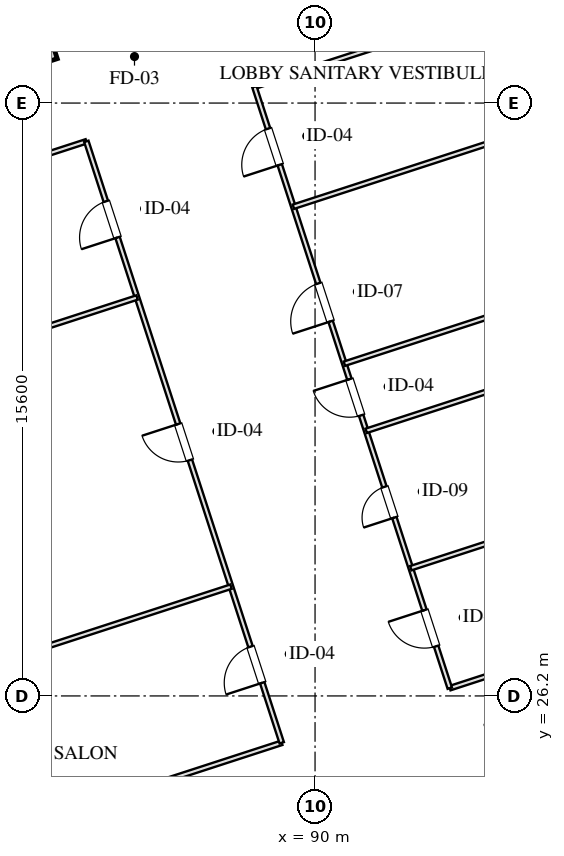
"""IFC4 building model, lengths in metres.
Left out: names, types, materials, properties, quantities, classifications, styles, units other than length and angle.
Written with IfcOpenShell. Run it as: python <this file> out.ifc"""

import sys

from ifc_helpers import new_model, si_unit, direction, frame, frame_2d, origin, place, context, subcontext, project, spatial, rectangle, extrude, element, fill, save


model = new_model("IFC4")
c1 = context("Model", 3, precision=1e-05, world=origin(), true_north=direction((0.0, 1.0)))
c2 = subcontext(c1, "Body", "Model", "MODEL_VIEW")
j1 = project(units=[si_unit("LENGTHUNIT", "METRE"), si_unit("PLANEANGLEUNIT", "RADIAN")], contexts=[c1])
p1 = place(None, origin())
s1 = spatial("IfcSite", under=j1, at=p1, CompositionType="ELEMENT")
p2 = place(p1, origin())
s2 = spatial("IfcBuilding", under=s1, at=p2, CompositionType="ELEMENT")
p3 = place(p2, frame((0.0, 0.0, 60.95)))
s3 = spatial("IfcBuildingStorey", under=s2, at=p3, CompositionType="ELEMENT", Elevation=60.95)
p4 = place(p3, frame((79.016, 41.997, 0.0), z_axis=(0.0, 0.0, 1.0), x_axis=(0.95106038264, 0.309005094736, 0.0)))
e1 = element("IfcWall", 1, at=p4, inside=s3, PredefinedType="SHEAR", context=c2, shape_type="SweptSolid", body=[
    extrude(rectangle(XDim=4.295, YDim=0.75, at=frame_2d((2.147, 0.0))), origin(), (0.0, 0.0, 1.0), 3.45),
])
p5 = place(p3, frame((93.542, 23.585, 0.0), z_axis=(0.0, 0.0, 1.0), x_axis=(0.951063829732, 0.308994485023, 0.0)))
e2 = element("IfcWall", 2, at=p5, inside=s3, PredefinedType="PARTITIONING", context=c2, shape_type="SweptSolid", body=[
    extrude(rectangle(XDim=4.4, YDim=0.15, at=frame_2d((2.2, 0.0))), origin(), (0.0, 0.0, 1.0), 3.175),
])
p6 = place(p5, frame((1.45, 0.0, 0.0)))
e3 = element("IfcOpeningElement", 3, at=p6, cuts=e2, PredefinedType="OPENING", context=c2, shape_type="SweptSolid", body=[
    extrude(rectangle(XDim=1.5, YDim=2.05, at=frame_2d((0.75, 1.025))), frame((0.0, 0.085, 0.0), z_axis=(0.0, -1.0, 0.0), x_axis=(1.0, 0.0, 0.0)), (0.0, 0.0, 1.0), 0.17),
])
p7 = place(p3, frame((74.691, 20.278, 0.0), z_axis=(0.0, 0.0, 1.0), x_axis=(0.951054756643, 0.309022409974, 0.0)))
e4 = element("IfcWall", 4, at=p7, inside=s3, PredefinedType="PARTITIONING", context=c2, shape_type="SweptSolid", body=[
    extrude(rectangle(XDim=15.175, YDim=0.12, at=frame_2d((7.587, 0.0))), origin(), (0.0, 0.0, 1.0), 3.175),
])
p8 = place(p3, frame((93.546, 26.404, 0.0), z_axis=(0.0, 0.0, 1.0), x_axis=(0.951058189574, 0.309011844505, 0.0)))
e5 = element("IfcWall", 5, at=p8, inside=s3, PredefinedType="PARTITIONING", context=c2, shape_type="SweptSolid", body=[
    extrude(rectangle(XDim=17.775, YDim=0.12, at=frame_2d((8.887, 0.0))), origin(), (0.0, 0.0, 1.0), 3.175),
])
p9 = place(p3, frame((69.549, 36.103, 0.0), z_axis=(0.0, 0.0, 1.0), x_axis=(0.951054756643, 0.309022409974, 0.0)))
e6 = element("IfcWall", 6, at=p9, inside=s3, PredefinedType="PARTITIONING", context=c2, shape_type="SweptSolid", body=[
    extrude(rectangle(XDim=15.175, YDim=0.12, at=frame_2d((7.587, 0.0))), origin(), (0.0, 0.0, 1.0), 3.175),
])
p10 = place(p3, frame((88.404, 42.229, 0.0), z_axis=(0.0, 0.0, 1.0), x_axis=(0.951054152931, 0.309024267966, 0.0)))
e7 = element("IfcWall", 7, at=p10, inside=s3, PredefinedType="PARTITIONING", context=c2, shape_type="SweptSolid", body=[
    extrude(rectangle(XDim=17.775, YDim=0.12, at=frame_2d((8.888, 0.0))), origin(), (0.0, 0.0, 1.0), 3.175),
])
p11 = place(p3, frame((89.124, 24.967, 0.0), z_axis=(0.0, 0.0, 1.0), x_axis=(-0.30901773025, 0.951056277195, 0.0)))
e8 = element("IfcWall", 8, at=p11, inside=s3, PredefinedType="PARTITIONING", context=c2, shape_type="SweptSolid", body=[
    extrude(rectangle(XDim=16.64, YDim=0.12, at=frame_2d((8.32, 0.0))), origin(), (0.0, 0.0, 1.0), 3.175),
])
p12 = place(p11, frame((1.66, 0.0, 0.0)))
e9 = element("IfcOpeningElement", 9, at=p12, cuts=e8, PredefinedType="OPENING", context=c2, shape_type="SweptSolid", body=[
    extrude(rectangle(XDim=1.0, YDim=2.05, at=frame_2d((0.5, 1.025))), frame((0.0, 0.07, 0.0), z_axis=(0.0, -1.0, 0.0), x_axis=(1.0, 0.0, 0.0)), (0.0, 0.0, 1.0), 0.14),
])
p13 = place(p11, frame((7.82, 0.0, 0.0)))
e10 = element("IfcOpeningElement", 10, at=p13, cuts=e8, PredefinedType="OPENING", context=c2, shape_type="SweptSolid", body=[
    extrude(rectangle(XDim=1.0, YDim=2.05, at=frame_2d((0.5, 1.025))), frame((0.0, 0.07, 0.0), z_axis=(0.0, -1.0, 0.0), x_axis=(1.0, 0.0, 0.0)), (0.0, 0.0, 1.0), 0.14),
])
p14 = place(p11, frame((13.98, 0.0, 0.0)))
e11 = element("IfcOpeningElement", 11, at=p14, cuts=e8, PredefinedType="OPENING", context=c2, shape_type="SweptSolid", body=[
    extrude(rectangle(XDim=1.0, YDim=2.05, at=frame_2d((0.5, 1.025))), frame((0.0, 0.07, 0.0), z_axis=(0.0, -1.0, 0.0), x_axis=(1.0, 0.0, 0.0)), (0.0, 0.0, 1.0), 0.14),
])
p15 = place(p3, frame((93.546, 26.404, 0.0), z_axis=(0.0, 0.0, 1.0), x_axis=(-0.309022042254, 0.951054876125, 0.0)))
e12 = element("IfcWall", 12, at=p15, inside=s3, PredefinedType="PARTITIONING", context=c2, shape_type="SweptSolid", body=[
    extrude(rectangle(XDim=16.64, YDim=0.12, at=frame_2d((8.32, 0.0))), origin(), (0.0, 0.0, 1.0), 3.175),
])
p16 = place(p15, frame((1.16, 0.0, 0.0)))
e13 = element("IfcOpeningElement", 13, at=p16, cuts=e12, PredefinedType="OPENING", context=c2, shape_type="SweptSolid", body=[
    extrude(rectangle(XDim=1.0, YDim=2.05, at=frame_2d((0.5, 1.025))), frame((0.0, 0.07, 0.0), z_axis=(0.0, -1.0, 0.0), x_axis=(1.0, 0.0, 0.0)), (0.0, 0.0, 1.0), 0.14),
])
p17 = place(p15, frame((4.72, 0.0, 0.0)))
e14 = element("IfcOpeningElement", 14, at=p17, cuts=e12, PredefinedType="OPENING", context=c2, shape_type="SweptSolid", body=[
    extrude(rectangle(XDim=0.85, YDim=2.05, at=frame_2d((0.425, 1.025))), frame((0.0, 0.07, 0.0), z_axis=(0.0, -1.0, 0.0), x_axis=(1.0, 0.0, 0.0)), (0.0, 0.0, 1.0), 0.14),
])
p18 = place(p15, frame((7.549, 0.0, 0.0)))
e15 = element("IfcOpeningElement", 15, at=p18, cuts=e12, PredefinedType="OPENING", context=c2, shape_type="SweptSolid", body=[
    extrude(rectangle(XDim=1.0, YDim=2.05, at=frame_2d((0.5, 1.025))), frame((0.0, 0.07, 0.0), z_axis=(0.0, -1.0, 0.0), x_axis=(1.0, 0.0, 0.0)), (0.0, 0.0, 1.0), 0.14),
])
p19 = place(p15, frame((10.148, 0.0, 0.0)))
e16 = element("IfcOpeningElement", 16, at=p19, cuts=e12, PredefinedType="OPENING", context=c2, shape_type="SweptSolid", body=[
    extrude(rectangle(XDim=1.05, YDim=2.05, at=frame_2d((0.525, 1.025))), frame((0.0, 0.07, 0.0), z_axis=(0.0, -1.0, 0.0), x_axis=(1.0, 0.0, 0.0)), (0.0, 0.0, 1.0), 0.14),
])
p20 = place(p15, frame((14.48, 0.0, 0.0)))
e17 = element("IfcOpeningElement", 17, at=p20, cuts=e12, PredefinedType="OPENING", context=c2, shape_type="SweptSolid", body=[
    extrude(rectangle(XDim=1.0, YDim=2.05, at=frame_2d((0.5, 1.025))), frame((0.0, 0.07, 0.0), z_axis=(0.0, -1.0, 0.0), x_axis=(1.0, 0.0, 0.0)), (0.0, 0.0, 1.0), 0.14),
])
for number, where, z_axis, x_axis in (
    (18, (73.356, 24.386, 0.0), (0.0, 0.0, 1.0), (0.951, 0.309, 0.0)),
    (19, (70.884, 31.995, 0.0), (0.0, 0.0, 1.0), (0.951, 0.309, 0.0)),
):
    element("IfcWall", number, at=place(p3, frame(where, z_axis=z_axis, x_axis=x_axis)), inside=s3, PredefinedType="PARTITIONING", context=c2, shape_type="SweptSolid", body=[
        extrude(rectangle(XDim=15.175, YDim=0.12, at=frame_2d((7.587, 0.0))), origin(), (0.0, 0.0, 1.0), 3.175),
    ])
for number, where, z_axis, x_axis in (
    (20, (92.52, 29.562, 0.0), (0.0, 0.0, 1.0), (0.951, 0.309, 0.0)),
    (21, (91.346, 33.176, 0.0), (0.0, 0.0, 1.0), (0.951, 0.309, 0.0)),
    (22, (90.772, 34.942, 0.0), (0.0, 0.0, 1.0), (0.951, 0.309, 0.0)),
    (23, (89.43, 39.072, 0.0), (0.0, 0.0, 1.0), (0.951, 0.309, 0.0)),
):
    element("IfcWall", number, at=place(p3, frame(where, z_axis=z_axis, x_axis=x_axis)), inside=s3, PredefinedType="PARTITIONING", context=c2, shape_type="SweptSolid", body=[
        extrude(rectangle(XDim=17.775, YDim=0.12, at=frame_2d((8.887, 0.0))), origin(), (0.0, 0.0, 1.0), 3.175),
    ])
p21 = place(p12, origin())
e24 = element("IfcDoor", 24, at=p21, inside=s3, OperationType="SINGLE_SWING_LEFT", PredefinedType="DOOR", context=c2, shape_type="SweptSolid", body=[
    extrude(rectangle(XDim=1.0, YDim=2.05, at=frame_2d((0.5, 1.025))), frame((0.0, 0.025, 0.0), z_axis=(0.0, -1.0, 0.0), x_axis=(1.0, 0.0, 0.0)), (0.0, 0.0, 1.0), 0.05),
])
fill(e9, e24)
p22 = place(p13, origin())
e25 = element("IfcDoor", 25, at=p22, inside=s3, OperationType="SINGLE_SWING_RIGHT", PredefinedType="DOOR", context=c2, shape_type="SweptSolid", body=[
    extrude(rectangle(XDim=1.0, YDim=2.05, at=frame_2d((0.5, 1.025))), frame((0.0, 0.025, 0.0), z_axis=(0.0, -1.0, 0.0), x_axis=(1.0, 0.0, 0.0)), (0.0, 0.0, 1.0), 0.05),
])
fill(e10, e25)
p23 = place(p14, origin())
e26 = element("IfcDoor", 26, at=p23, inside=s3, OperationType="SINGLE_SWING_LEFT", PredefinedType="DOOR", context=c2, shape_type="SweptSolid", body=[
    extrude(rectangle(XDim=1.0, YDim=2.05, at=frame_2d((0.5, 1.025))), frame((0.0, 0.025, 0.0), z_axis=(0.0, -1.0, 0.0), x_axis=(1.0, 0.0, 0.0)), (0.0, 0.0, 1.0), 0.05),
])
fill(e11, e26)
p24 = place(p16, origin())
e27 = element("IfcDoor", 27, at=p24, inside=s3, OperationType="SINGLE_SWING_RIGHT", PredefinedType="DOOR", context=c2, shape_type="SweptSolid", body=[
    extrude(rectangle(XDim=1.0, YDim=2.05, at=frame_2d((0.5, 1.025))), frame((0.0, 0.025, 0.0), z_axis=(0.0, -1.0, 0.0), x_axis=(1.0, 0.0, 0.0)), (0.0, 0.0, 1.0), 0.05),
])
fill(e13, e27)
p25 = place(p17, origin())
e28 = element("IfcDoor", 28, at=p25, inside=s3, OperationType="SINGLE_SWING_LEFT", PredefinedType="DOOR", context=c2, shape_type="SweptSolid", body=[
    extrude(rectangle(XDim=0.85, YDim=2.05, at=frame_2d((0.425, 1.025))), frame((0.0, 0.025, 0.0), z_axis=(0.0, -1.0, 0.0), x_axis=(1.0, 0.0, 0.0)), (0.0, 0.0, 1.0), 0.05),
])
fill(e14, e28)
p26 = place(p18, origin())
e29 = element("IfcDoor", 29, at=p26, inside=s3, OperationType="SINGLE_SWING_RIGHT", PredefinedType="DOOR", context=c2, shape_type="SweptSolid", body=[
    extrude(rectangle(XDim=1.0, YDim=2.05, at=frame_2d((0.5, 1.025))), frame((0.0, 0.025, 0.0), z_axis=(0.0, -1.0, 0.0), x_axis=(1.0, 0.0, 0.0)), (0.0, 0.0, 1.0), 0.05),
])
fill(e15, e29)
p27 = place(p19, origin())
e30 = element("IfcDoor", 30, at=p27, inside=s3, OperationType="SINGLE_SWING_LEFT", PredefinedType="DOOR", context=c2, shape_type="SweptSolid", body=[
    extrude(rectangle(XDim=1.05, YDim=2.05, at=frame_2d((0.525, 1.025))), frame((0.0, 0.025, 0.0), z_axis=(0.0, -1.0, 0.0), x_axis=(1.0, 0.0, 0.0)), (0.0, 0.0, 1.0), 0.05),
])
fill(e16, e30)
p28 = place(p20, origin())
e31 = element("IfcDoor", 31, at=p28, inside=s3, OperationType="SINGLE_SWING_LEFT", PredefinedType="DOOR", context=c2, shape_type="SweptSolid", body=[
    extrude(rectangle(XDim=1.0, YDim=2.05, at=frame_2d((0.5, 1.025))), frame((0.0, 0.025, 0.0), z_axis=(0.0, -1.0, 0.0), x_axis=(1.0, 0.0, 0.0)), (0.0, 0.0, 1.0), 0.05),
])
fill(e17, e31)
save(model, sys.argv[1])
